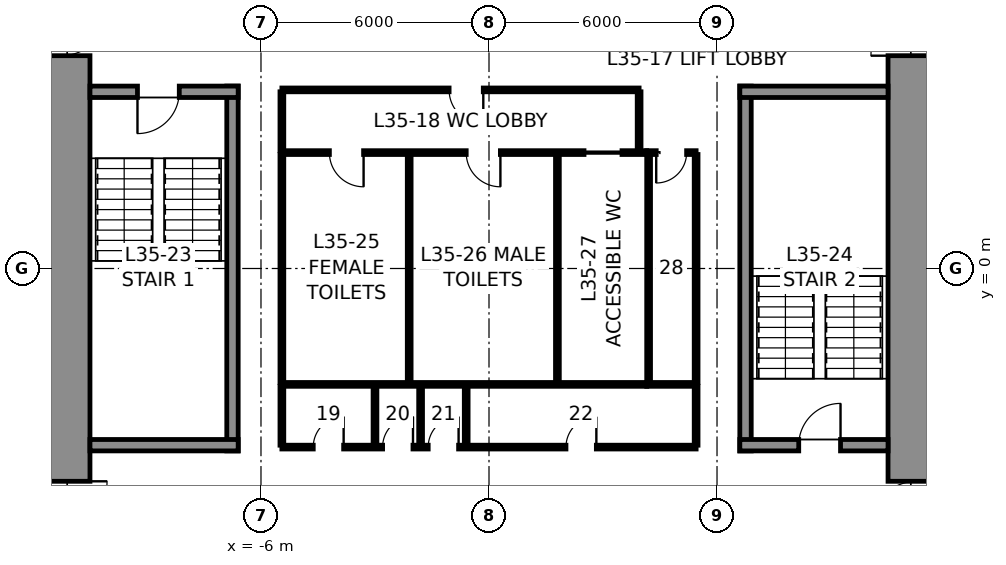
"""IFC4 building model, lengths in metres.
Left out: names, types, materials, properties, quantities, classifications, styles, units other than length and angle.
Written with IfcOpenShell. Run it as: python <this file> out.ifc"""

import sys

from ifc_helpers import new_model, si_unit, direction, frame, frame_2d, origin, place, context, subcontext, project, spatial, rectangle, extrude, element, fill, save


model = new_model("IFC4")
c1 = context("Model", 3, precision=1e-05, world=origin(), true_north=direction((0.0, 1.0)))
c2 = subcontext(c1, "Body", "Model", "MODEL_VIEW")
j1 = project(units=[si_unit("LENGTHUNIT", "METRE"), si_unit("PLANEANGLEUNIT", "RADIAN")], contexts=[c1])
p1 = place(None, origin())
s1 = spatial("IfcSite", under=j1, at=p1, CompositionType="ELEMENT")
p2 = place(p1, origin())
s2 = spatial("IfcBuilding", under=s1, at=p2, CompositionType="ELEMENT")
p3 = place(p2, frame((0.0, 0.0, 167.8)))
s3 = spatial("IfcBuildingStorey", under=s2, at=p3, CompositionType="ELEMENT", Elevation=167.8)
p4 = place(p3, frame((11.25, 10.5, 0.0), z_axis=(0.0, 0.0, 1.0), x_axis=(0.0, -1.0, 0.0)))
e1 = element("IfcWall", 1, at=p4, inside=s3, PredefinedType="SHEAR", context=c2, shape_type="SweptSolid", body=[
    extrude(rectangle(XDim=21.0, YDim=1.5, at=frame_2d((10.5, 0.0))), origin(), (0.0, 0.0, 1.0), 4.0),
])
p5 = place(p4, frame((3.7, 0.0, 0.0)))
e2 = element("IfcOpeningElement", 2, at=p5, cuts=e1, PredefinedType="OPENING", context=c2, shape_type="SweptSolid", body=[
    extrude(rectangle(XDim=1.2, YDim=2.3, at=frame_2d((0.6, 1.15))), frame((0.0, 0.76, 0.0), z_axis=(0.0, -1.0, 0.0), x_axis=(1.0, 0.0, 0.0)), (0.0, 0.0, 1.0), 1.52),
])
p6 = place(p4, frame((16.1, 0.0, 0.0)))
e3 = element("IfcOpeningElement", 3, at=p6, cuts=e1, PredefinedType="OPENING", context=c2, shape_type="SweptSolid", body=[
    extrude(rectangle(XDim=1.2, YDim=2.3, at=frame_2d((0.6, 1.15))), frame((0.0, 0.76, 0.0), z_axis=(0.0, -1.0, 0.0), x_axis=(1.0, 0.0, 0.0)), (0.0, 0.0, 1.0), 1.52),
])
p7 = place(p3, frame((-11.25, -10.5, 0.0), z_axis=(0.0, 0.0, 1.0), x_axis=(0.0, 1.0, 0.0)))
e4 = element("IfcWall", 4, at=p7, inside=s3, PredefinedType="SHEAR", context=c2, shape_type="SweptSolid", body=[
    extrude(rectangle(XDim=21.0, YDim=1.5, at=frame_2d((10.5, 0.0))), origin(), (0.0, 0.0, 1.0), 4.0),
])
p8 = place(p7, frame((16.1, 0.0, 0.0)))
e5 = element("IfcOpeningElement", 5, at=p8, cuts=e4, PredefinedType="OPENING", context=c2, shape_type="SweptSolid", body=[
    extrude(rectangle(XDim=1.2, YDim=2.3, at=frame_2d((0.6, 1.15))), frame((0.0, 0.76, 0.0), z_axis=(0.0, -1.0, 0.0), x_axis=(1.0, 0.0, 0.0)), (0.0, 0.0, 1.0), 1.52),
])
p9 = place(p7, frame((3.7, 0.0, 0.0)))
e6 = element("IfcOpeningElement", 6, at=p9, cuts=e4, PredefinedType="OPENING", context=c2, shape_type="SweptSolid", body=[
    extrude(rectangle(XDim=1.2, YDim=2.3, at=frame_2d((0.6, 1.15))), frame((0.0, 0.76, 0.0), z_axis=(0.0, -1.0, 0.0), x_axis=(1.0, 0.0, 0.0)), (0.0, 0.0, 1.0), 1.52),
])
p10 = place(p3, frame((-6.75, -4.8, 0.0), z_axis=(0.0, 0.0, 1.0), x_axis=(0.0, 1.0, 0.0)))
e7 = element("IfcWall", 7, at=p10, inside=s3, PredefinedType="SOLIDWALL", context=c2, shape_type="SweptSolid", body=[
    extrude(rectangle(XDim=9.6, YDim=0.3, at=frame_2d((4.8, 0.0))), origin(), (0.0, 0.0, 1.0), 3.75),
])
p11 = place(p3, frame((-10.5, 4.65, 0.0), z_axis=(0.0, 0.0, 1.0), x_axis=(1.0, 0.0, 0.0)))
e8 = element("IfcWall", 8, at=p11, inside=s3, PredefinedType="SOLIDWALL", context=c2, shape_type="SweptSolid", body=[
    extrude(rectangle(XDim=3.9, YDim=0.3, at=frame_2d((1.95, 0.0))), origin(), (0.0, 0.0, 1.0), 3.75),
])
p12 = place(p11, frame((1.25, 0.0, 0.0)))
e9 = element("IfcOpeningElement", 9, at=p12, cuts=e8, PredefinedType="OPENING", context=c2, shape_type="SweptSolid", body=[
    extrude(rectangle(XDim=1.1, YDim=2.3, at=frame_2d((0.55, 1.15))), frame((0.0, 0.16, 0.0), z_axis=(0.0, -1.0, 0.0), x_axis=(1.0, 0.0, 0.0)), (0.0, 0.0, 1.0), 0.32),
])
p13 = place(p3, frame((-6.6, -4.65, 0.0), z_axis=(0.0, 0.0, 1.0), x_axis=(-1.0, 0.0, 0.0)))
e10 = element("IfcWall", 10, at=p13, inside=s3, PredefinedType="SOLIDWALL", context=c2, shape_type="SweptSolid", body=[
    extrude(rectangle(XDim=3.9, YDim=0.3, at=frame_2d((1.95, 0.0))), origin(), (0.0, 0.0, 1.0), 3.75),
])
p14 = place(p3, frame((6.75, -4.8, 0.0), z_axis=(0.0, 0.0, 1.0), x_axis=(0.0, 1.0, 0.0)))
e11 = element("IfcWall", 11, at=p14, inside=s3, PredefinedType="SOLIDWALL", context=c2, shape_type="SweptSolid", body=[
    extrude(rectangle(XDim=9.6, YDim=0.3, at=frame_2d((4.8, 0.0))), origin(), (0.0, 0.0, 1.0), 3.75),
])
p15 = place(p3, frame((6.6, 4.65, 0.0), z_axis=(0.0, 0.0, 1.0), x_axis=(1.0, 0.0, 0.0)))
e12 = element("IfcWall", 12, at=p15, inside=s3, PredefinedType="SOLIDWALL", context=c2, shape_type="SweptSolid", body=[
    extrude(rectangle(XDim=3.9, YDim=0.3, at=frame_2d((1.95, 0.0))), origin(), (0.0, 0.0, 1.0), 3.75),
])
p16 = place(p3, frame((10.5, -4.65, 0.0), z_axis=(0.0, 0.0, 1.0), x_axis=(-1.0, 0.0, 0.0)))
e13 = element("IfcWall", 13, at=p16, inside=s3, PredefinedType="SOLIDWALL", context=c2, shape_type="SweptSolid", body=[
    extrude(rectangle(XDim=3.9, YDim=0.3, at=frame_2d((1.95, 0.0))), origin(), (0.0, 0.0, 1.0), 3.75),
])
p17 = place(p16, frame((1.25, 0.0, 0.0)))
e14 = element("IfcOpeningElement", 14, at=p17, cuts=e13, PredefinedType="OPENING", context=c2, shape_type="SweptSolid", body=[
    extrude(rectangle(XDim=1.1, YDim=2.3, at=frame_2d((0.55, 1.15))), frame((0.0, 0.16, 0.0), z_axis=(0.0, -1.0, 0.0), x_axis=(1.0, 0.0, 0.0)), (0.0, 0.0, 1.0), 0.32),
])
p18 = place(p3, frame((-5.45, 3.05, 0.0), z_axis=(0.0, 0.0, 1.0), x_axis=(1.0, 0.0, 0.0)))
e15 = element("IfcWall", 15, at=p18, inside=s3, PredefinedType="PARTITIONING", context=c2, shape_type="SweptSolid", body=[
    extrude(rectangle(XDim=9.6, YDim=0.1, at=frame_2d((4.8, 0.0))), origin(), (0.0, 0.0, 1.0), 3.75),
])
p19 = place(p18, frame((1.25, 0.0, 0.0)))
e16 = element("IfcOpeningElement", 16, at=p19, cuts=e15, PredefinedType="OPENING", context=c2, shape_type="SweptSolid", body=[
    extrude(rectangle(XDim=0.9, YDim=2.3, at=frame_2d((0.45, 1.15))), frame((0.0, 0.06, 0.0), z_axis=(0.0, -1.0, 0.0), x_axis=(1.0, 0.0, 0.0)), (0.0, 0.0, 1.0), 0.12),
])
p20 = place(p18, frame((4.85, 0.0, 0.0)))
e17 = element("IfcOpeningElement", 17, at=p20, cuts=e15, PredefinedType="OPENING", context=c2, shape_type="SweptSolid", body=[
    extrude(rectangle(XDim=0.9, YDim=2.3, at=frame_2d((0.45, 1.15))), frame((0.0, 0.06, 0.0), z_axis=(0.0, -1.0, 0.0), x_axis=(1.0, 0.0, 0.0)), (0.0, 0.0, 1.0), 0.12),
])
p21 = place(p18, frame((7.95, 0.0, 0.0)))
e18 = element("IfcOpeningElement", 18, at=p21, cuts=e15, PredefinedType="OPENING", context=c2, shape_type="SweptSolid", body=[
    extrude(rectangle(XDim=1.0, YDim=2.3, at=frame_2d((0.5, 1.15))), frame((0.0, 0.06, 0.0), z_axis=(0.0, -1.0, 0.0), x_axis=(1.0, 0.0, 0.0)), (0.0, 0.0, 1.0), 0.12),
])
p22 = place(p3, frame((4.15, 3.05, 0.0), z_axis=(0.0, 0.0, 1.0), x_axis=(1.0, 0.0, 0.0)))
e19 = element("IfcWall", 19, at=p22, inside=s3, PredefinedType="PARTITIONING", context=c2, shape_type="SweptSolid", body=[
    extrude(rectangle(XDim=1.3, YDim=0.1, at=frame_2d((0.65, 0.0))), origin(), (0.0, 0.0, 1.0), 3.75),
])
p23 = place(p22, frame((0.25, 0.0, 0.0)))
e20 = element("IfcOpeningElement", 20, at=p23, cuts=e19, PredefinedType="OPENING", context=c2, shape_type="SweptSolid", body=[
    extrude(rectangle(XDim=0.8, YDim=2.3, at=frame_2d((0.4, 1.15))), frame((0.0, 0.06, 0.0), z_axis=(0.0, -1.0, 0.0), x_axis=(1.0, 0.0, 0.0)), (0.0, 0.0, 1.0), 0.12),
])
p24 = place(p3, frame((4.15, -3.05, 0.0), z_axis=(0.0, 0.0, 1.0), x_axis=(-1.0, 0.0, 0.0)))
e21 = element("IfcWall", 21, at=p24, inside=s3, PredefinedType="PARTITIONING", context=c2, shape_type="SweptSolid", body=[
    extrude(rectangle(XDim=9.6, YDim=0.1, at=frame_2d((4.8, 0.0))), origin(), (0.0, 0.0, 1.0), 3.75),
])
p25 = place(p3, frame((5.45, -3.05, 0.0), z_axis=(0.0, 0.0, 1.0), x_axis=(-1.0, 0.0, 0.0)))
e22 = element("IfcWall", 22, at=p25, inside=s3, PredefinedType="PARTITIONING", context=c2, shape_type="SweptSolid", body=[
    extrude(rectangle(XDim=1.3, YDim=0.1, at=frame_2d((0.65, 0.0))), origin(), (0.0, 0.0, 1.0), 3.75),
])
for number, where, z_axis, x_axis in (
    (23, (5.45, 3.0, 0.0), (0.0, 0.0, 1.0), (0.0, -1.0, 0.0)),
    (24, (-5.45, -3.0, 0.0), (0.0, 0.0, 1.0), (0.0, 1.0, 0.0)),
    (25, (-2.1, -3.0, 0.0), (0.0, 0.0, 1.0), (0.0, 1.0, 0.0)),
    (26, (1.8, -3.0, 0.0), (0.0, 0.0, 1.0), (0.0, 1.0, 0.0)),
    (27, (4.2, -3.0, 0.0), (0.0, 0.0, 1.0), (0.0, 1.0, 0.0)),
):
    element("IfcWall", number, at=place(p3, frame(where, z_axis=z_axis, x_axis=x_axis)), inside=s3, PredefinedType="PARTITIONING", context=c2, shape_type="SweptSolid", body=[
        extrude(rectangle(XDim=6.0, YDim=0.1, at=frame_2d((3.0, 0.0))), origin(), (0.0, 0.0, 1.0), 3.75),
    ])
p26 = place(p3, frame((-5.45, 4.7, 0.0), z_axis=(0.0, 0.0, 1.0), x_axis=(1.0, 0.0, 0.0)))
e28 = element("IfcWall", 28, at=p26, inside=s3, PredefinedType="PARTITIONING", context=c2, shape_type="SweptSolid", body=[
    extrude(rectangle(XDim=9.4, YDim=0.1, at=frame_2d((4.7, 0.0))), origin(), (0.0, 0.0, 1.0), 3.75),
])
p27 = place(p26, frame((4.4, 0.0, 0.0)))
e29 = element("IfcOpeningElement", 29, at=p27, cuts=e28, PredefinedType="OPENING", context=c2, shape_type="SweptSolid", body=[
    extrude(rectangle(XDim=0.9, YDim=2.3, at=frame_2d((0.45, 1.15))), frame((0.0, 0.06, 0.0), z_axis=(0.0, -1.0, 0.0), x_axis=(1.0, 0.0, 0.0)), (0.0, 0.0, 1.0), 0.12),
])
for number, where, z_axis, x_axis in (
    (30, (-5.45, 3.1, 0.0), (0.0, 0.0, 1.0), (0.0, 1.0, 0.0)),
    (31, (3.95, 3.1, 0.0), (0.0, 0.0, 1.0), (0.0, 1.0, 0.0)),
):
    element("IfcWall", number, at=place(p3, frame(where, z_axis=z_axis, x_axis=x_axis)), inside=s3, PredefinedType="PARTITIONING", context=c2, shape_type="SweptSolid", body=[
        extrude(rectangle(XDim=1.55, YDim=0.1, at=frame_2d((0.775, 0.0))), origin(), (0.0, 0.0, 1.0), 3.75),
    ])
p28 = place(p3, frame((5.45, -4.7, 0.0), z_axis=(0.0, 0.0, 1.0), x_axis=(-1.0, 0.0, 0.0)))
e32 = element("IfcWall", 32, at=p28, inside=s3, PredefinedType="PARTITIONING", context=c2, shape_type="SweptSolid", body=[
    extrude(rectangle(XDim=10.9, YDim=0.1, at=frame_2d((5.45, 0.0))), origin(), (0.0, 0.0, 1.0), 3.75),
])
p29 = place(p28, frame((9.275, 0.0, 0.0)))
e33 = element("IfcOpeningElement", 33, at=p29, cuts=e32, PredefinedType="OPENING", context=c2, shape_type="SweptSolid", body=[
    extrude(rectangle(XDim=0.8, YDim=2.3, at=frame_2d((0.4, 1.15))), frame((0.0, 0.06, 0.0), z_axis=(0.0, -1.0, 0.0), x_axis=(1.0, 0.0, 0.0)), (0.0, 0.0, 1.0), 0.12),
])
p30 = place(p28, frame((7.45, 0.0, 0.0)))
e34 = element("IfcOpeningElement", 34, at=p30, cuts=e32, PredefinedType="OPENING", context=c2, shape_type="SweptSolid", body=[
    extrude(rectangle(XDim=0.8, YDim=2.3, at=frame_2d((0.4, 1.15))), frame((0.0, 0.06, 0.0), z_axis=(0.0, -1.0, 0.0), x_axis=(1.0, 0.0, 0.0)), (0.0, 0.0, 1.0), 0.12),
])
p31 = place(p28, frame((6.25, 0.0, 0.0)))
e35 = element("IfcOpeningElement", 35, at=p31, cuts=e32, PredefinedType="OPENING", context=c2, shape_type="SweptSolid", body=[
    extrude(rectangle(XDim=0.8, YDim=2.3, at=frame_2d((0.4, 1.15))), frame((0.0, 0.06, 0.0), z_axis=(0.0, -1.0, 0.0), x_axis=(1.0, 0.0, 0.0)), (0.0, 0.0, 1.0), 0.12),
])
p32 = place(p28, frame((2.625, 0.0, 0.0)))
e36 = element("IfcOpeningElement", 36, at=p32, cuts=e32, PredefinedType="OPENING", context=c2, shape_type="SweptSolid", body=[
    extrude(rectangle(XDim=0.8, YDim=2.3, at=frame_2d((0.4, 1.15))), frame((0.0, 0.06, 0.0), z_axis=(0.0, -1.0, 0.0), x_axis=(1.0, 0.0, 0.0)), (0.0, 0.0, 1.0), 0.12),
])
for number, where, z_axis, x_axis in (
    (37, (-5.45, -3.1, 0.0), (0.0, 0.0, 1.0), (0.0, -1.0, 0.0)),
    (38, (5.45, -3.1, 0.0), (0.0, 0.0, 1.0), (0.0, -1.0, 0.0)),
    (39, (-3.0, -3.1, 0.0), (0.0, 0.0, 1.0), (0.0, -1.0, 0.0)),
    (40, (-1.8, -3.1, 0.0), (0.0, 0.0, 1.0), (0.0, -1.0, 0.0)),
    (41, (-0.6, -3.1, 0.0), (0.0, 0.0, 1.0), (0.0, -1.0, 0.0)),
):
    element("IfcWall", number, at=place(p3, frame(where, z_axis=z_axis, x_axis=x_axis)), inside=s3, PredefinedType="PARTITIONING", context=c2, shape_type="SweptSolid", body=[
        extrude(rectangle(XDim=1.55, YDim=0.1, at=frame_2d((0.775, 0.0))), origin(), (0.0, 0.0, 1.0), 3.75),
    ])
p33 = place(p12, frame((1.1, 0.0, 0.0), z_axis=(0.0, 0.0, 1.0), x_axis=(-1.0, 0.0, 0.0)))
e42 = element("IfcDoor", 42, at=p33, inside=s3, OperationType="SINGLE_SWING_RIGHT", PredefinedType="DOOR", context=c2, shape_type="SweptSolid", body=[
    extrude(rectangle(XDim=1.1, YDim=2.3, at=frame_2d((0.55, 1.15))), frame((0.0, 0.025, 0.0), z_axis=(0.0, -1.0, 0.0), x_axis=(1.0, 0.0, 0.0)), (0.0, 0.0, 1.0), 0.05),
])
fill(e9, e42)
p34 = place(p17, frame((1.1, 0.0, 0.0), z_axis=(0.0, 0.0, 1.0), x_axis=(-1.0, 0.0, 0.0)))
e43 = element("IfcDoor", 43, at=p34, inside=s3, OperationType="SINGLE_SWING_RIGHT", PredefinedType="DOOR", context=c2, shape_type="SweptSolid", body=[
    extrude(rectangle(XDim=1.1, YDim=2.3, at=frame_2d((0.55, 1.15))), frame((0.0, 0.025, 0.0), z_axis=(0.0, -1.0, 0.0), x_axis=(1.0, 0.0, 0.0)), (0.0, 0.0, 1.0), 0.05),
])
fill(e14, e43)
p35 = place(p19, frame((0.9, 0.0, 0.0), z_axis=(0.0, 0.0, 1.0), x_axis=(-1.0, 0.0, 0.0)))
e44 = element("IfcDoor", 44, at=p35, inside=s3, OperationType="SINGLE_SWING_LEFT", PredefinedType="DOOR", context=c2, shape_type="SweptSolid", body=[
    extrude(rectangle(XDim=0.9, YDim=2.3, at=frame_2d((0.45, 1.15))), frame((0.0, 0.025, 0.0), z_axis=(0.0, -1.0, 0.0), x_axis=(1.0, 0.0, 0.0)), (0.0, 0.0, 1.0), 0.05),
])
fill(e16, e44)
p36 = place(p20, frame((0.9, 0.0, 0.0), z_axis=(0.0, 0.0, 1.0), x_axis=(-1.0, 0.0, 0.0)))
e45 = element("IfcDoor", 45, at=p36, inside=s3, OperationType="SINGLE_SWING_LEFT", PredefinedType="DOOR", context=c2, shape_type="SweptSolid", body=[
    extrude(rectangle(XDim=0.9, YDim=2.3, at=frame_2d((0.45, 1.15))), frame((0.0, 0.025, 0.0), z_axis=(0.0, -1.0, 0.0), x_axis=(1.0, 0.0, 0.0)), (0.0, 0.0, 1.0), 0.05),
])
fill(e17, e45)
p37 = place(p21, frame((1.0, 0.0, 0.0), z_axis=(0.0, 0.0, 1.0), x_axis=(-1.0, 0.0, 0.0)))
e46 = element("IfcDoor", 46, at=p37, inside=s3, OperationType="SLIDING_TO_LEFT", PredefinedType="DOOR", context=c2, shape_type="SweptSolid", body=[
    extrude(rectangle(XDim=1.0, YDim=2.3, at=frame_2d((0.5, 1.15))), frame((0.0, 0.025, 0.0), z_axis=(0.0, -1.0, 0.0), x_axis=(1.0, 0.0, 0.0)), (0.0, 0.0, 1.0), 0.05),
])
fill(e18, e46)
p38 = place(p23, frame((0.8, 0.0, 0.0), z_axis=(0.0, 0.0, 1.0), x_axis=(-1.0, 0.0, 0.0)))
e47 = element("IfcDoor", 47, at=p38, inside=s3, OperationType="SINGLE_SWING_RIGHT", PredefinedType="DOOR", context=c2, shape_type="SweptSolid", body=[
    extrude(rectangle(XDim=0.8, YDim=2.3, at=frame_2d((0.4, 1.15))), frame((0.0, 0.025, 0.0), z_axis=(0.0, -1.0, 0.0), x_axis=(1.0, 0.0, 0.0)), (0.0, 0.0, 1.0), 0.05),
])
fill(e20, e47)
p39 = place(p27, frame((0.9, 0.0, 0.0), z_axis=(0.0, 0.0, 1.0), x_axis=(-1.0, 0.0, 0.0)))
e48 = element("IfcDoor", 48, at=p39, inside=s3, OperationType="SINGLE_SWING_LEFT", PredefinedType="DOOR", context=c2, shape_type="SweptSolid", body=[
    extrude(rectangle(XDim=0.9, YDim=2.3, at=frame_2d((0.45, 1.15))), frame((0.0, 0.025, 0.0), z_axis=(0.0, -1.0, 0.0), x_axis=(1.0, 0.0, 0.0)), (0.0, 0.0, 1.0), 0.05),
])
fill(e29, e48)
p40 = place(p29, frame((0.8, 0.0, 0.0), z_axis=(0.0, 0.0, 1.0), x_axis=(-1.0, 0.0, 0.0)))
e49 = element("IfcDoor", 49, at=p40, inside=s3, OperationType="SINGLE_SWING_RIGHT", PredefinedType="DOOR", context=c2, shape_type="SweptSolid", body=[
    extrude(rectangle(XDim=0.8, YDim=2.3, at=frame_2d((0.4, 1.15))), frame((0.0, 0.025, 0.0), z_axis=(0.0, -1.0, 0.0), x_axis=(1.0, 0.0, 0.0)), (0.0, 0.0, 1.0), 0.05),
])
fill(e33, e49)
p41 = place(p30, frame((0.8, 0.0, 0.0), z_axis=(0.0, 0.0, 1.0), x_axis=(-1.0, 0.0, 0.0)))
e50 = element("IfcDoor", 50, at=p41, inside=s3, OperationType="SINGLE_SWING_RIGHT", PredefinedType="DOOR", context=c2, shape_type="SweptSolid", body=[
    extrude(rectangle(XDim=0.8, YDim=2.3, at=frame_2d((0.4, 1.15))), frame((0.0, 0.025, 0.0), z_axis=(0.0, -1.0, 0.0), x_axis=(1.0, 0.0, 0.0)), (0.0, 0.0, 1.0), 0.05),
])
fill(e34, e50)
p42 = place(p31, frame((0.8, 0.0, 0.0), z_axis=(0.0, 0.0, 1.0), x_axis=(-1.0, 0.0, 0.0)))
e51 = element("IfcDoor", 51, at=p42, inside=s3, OperationType="SINGLE_SWING_RIGHT", PredefinedType="DOOR", context=c2, shape_type="SweptSolid", body=[
    extrude(rectangle(XDim=0.8, YDim=2.3, at=frame_2d((0.4, 1.15))), frame((0.0, 0.025, 0.0), z_axis=(0.0, -1.0, 0.0), x_axis=(1.0, 0.0, 0.0)), (0.0, 0.0, 1.0), 0.05),
])
fill(e35, e51)
p43 = place(p32, frame((0.8, 0.0, 0.0), z_axis=(0.0, 0.0, 1.0), x_axis=(-1.0, 0.0, 0.0)))
e52 = element("IfcDoor", 52, at=p43, inside=s3, OperationType="SINGLE_SWING_RIGHT", PredefinedType="DOOR", context=c2, shape_type="SweptSolid", body=[
    extrude(rectangle(XDim=0.8, YDim=2.3, at=frame_2d((0.4, 1.15))), frame((0.0, 0.025, 0.0), z_axis=(0.0, -1.0, 0.0), x_axis=(1.0, 0.0, 0.0)), (0.0, 0.0, 1.0), 0.05),
])
fill(e36, e52)
p44 = place(p8, frame((1.2, 0.0, 0.0), z_axis=(0.0, 0.0, 1.0), x_axis=(-1.0, 0.0, 0.0)))
e53 = element("IfcDoor", 53, at=p44, inside=s3, OperationType="SINGLE_SWING_LEFT", PredefinedType="DOOR", context=c2, shape_type="SweptSolid", body=[
    extrude(rectangle(XDim=1.2, YDim=2.3, at=frame_2d((0.6, 1.15))), frame((0.0, 0.025, 0.0), z_axis=(0.0, -1.0, 0.0), x_axis=(1.0, 0.0, 0.0)), (0.0, 0.0, 1.0), 0.05),
])
fill(e5, e53)
p45 = place(p9, frame((1.2, 0.0, 0.0), z_axis=(0.0, 0.0, 1.0), x_axis=(-1.0, 0.0, 0.0)))
e54 = element("IfcDoor", 54, at=p45, inside=s3, OperationType="SINGLE_SWING_LEFT", PredefinedType="DOOR", context=c2, shape_type="SweptSolid", body=[
    extrude(rectangle(XDim=1.2, YDim=2.3, at=frame_2d((0.6, 1.15))), frame((0.0, 0.025, 0.0), z_axis=(0.0, -1.0, 0.0), x_axis=(1.0, 0.0, 0.0)), (0.0, 0.0, 1.0), 0.05),
])
fill(e6, e54)
p46 = place(p5, frame((1.2, 0.0, 0.0), z_axis=(0.0, 0.0, 1.0), x_axis=(-1.0, 0.0, 0.0)))
e55 = element("IfcDoor", 55, at=p46, inside=s3, OperationType="SINGLE_SWING_LEFT", PredefinedType="DOOR", context=c2, shape_type="SweptSolid", body=[
    extrude(rectangle(XDim=1.2, YDim=2.3, at=frame_2d((0.6, 1.15))), frame((0.0, 0.025, 0.0), z_axis=(0.0, -1.0, 0.0), x_axis=(1.0, 0.0, 0.0)), (0.0, 0.0, 1.0), 0.05),
])
fill(e2, e55)
p47 = place(p6, frame((1.2, 0.0, 0.0), z_axis=(0.0, 0.0, 1.0), x_axis=(-1.0, 0.0, 0.0)))
e56 = element("IfcDoor", 56, at=p47, inside=s3, OperationType="SINGLE_SWING_LEFT", PredefinedType="DOOR", context=c2, shape_type="SweptSolid", body=[
    extrude(rectangle(XDim=1.2, YDim=2.3, at=frame_2d((0.6, 1.15))), frame((0.0, 0.025, 0.0), z_axis=(0.0, -1.0, 0.0), x_axis=(1.0, 0.0, 0.0)), (0.0, 0.0, 1.0), 0.05),
])
fill(e3, e56)
save(model, sys.argv[1])
